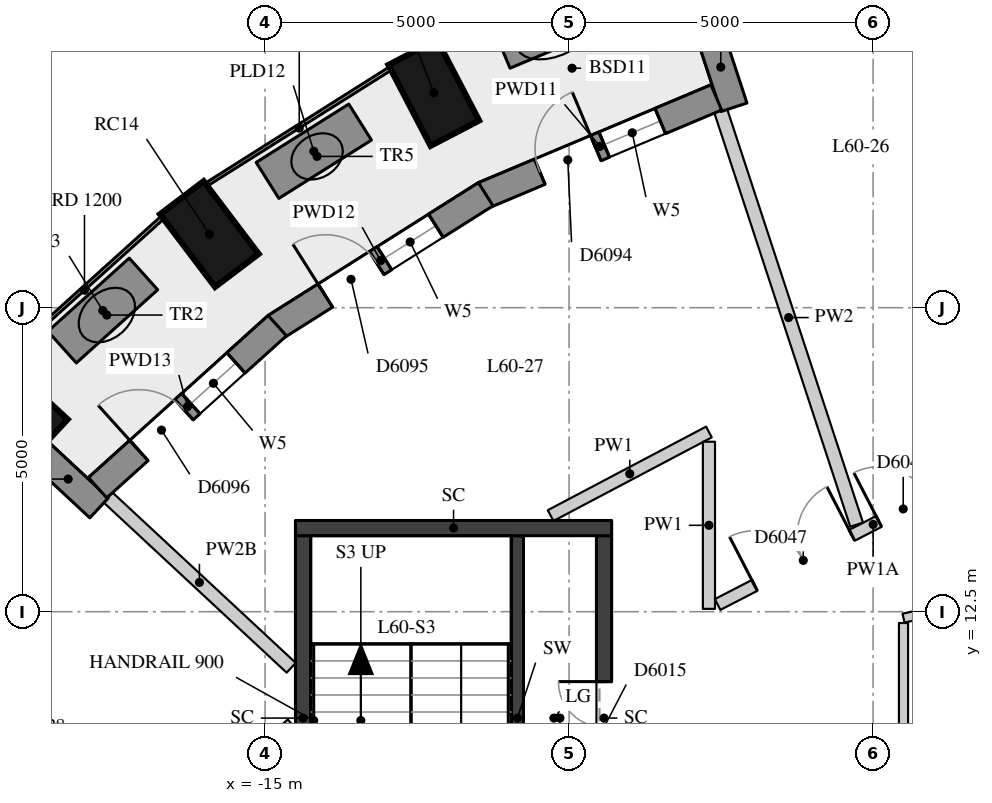
"""IFC4 building model, lengths in metres.
Left out: names, types, materials, properties, quantities, classifications, styles, units other than length and angle.
Written with IfcOpenShell. Run it as: python <this file> out.ifc"""

import sys

from ifc_helpers import new_model, si_unit, direction, frame, frame_2d, origin, origin_2d, place, context, subcontext, project, spatial, rectangle, extrude, element, fill, save


model = new_model("IFC4")
c1 = context("Model", 3, precision=1e-05, world=origin(), true_north=direction((0.0, 1.0)))
c2 = subcontext(c1, "Body", "Model", "MODEL_VIEW")
j1 = project(units=[si_unit("LENGTHUNIT", "METRE"), si_unit("PLANEANGLEUNIT", "RADIAN")], contexts=[c1])
p1 = place(None, origin())
s1 = spatial("IfcSite", under=j1, at=p1, CompositionType="ELEMENT")
p2 = place(p1, origin())
s2 = spatial("IfcBuilding", under=s1, at=p2, CompositionType="ELEMENT")
p3 = place(p2, frame((0.0, 0.0, 212.3)))
s3 = spatial("IfcBuildingStorey", under=s2, at=p3, CompositionType="ELEMENT", Elevation=212.3)
for number, where, z_axis, x_axis in (
    (1, (-12.225, 21.035, 0.0), (0.0, 0.0, 1.0), (-0.462, 0.887, 0.0)),
    (2, (-15.916, 18.71, 0.0), (0.0, 0.0, 1.0), (-0.604, 0.797, 0.0)),
    (3, (-19.102, 15.845, 0.0), (0.0, 0.0, 1.0), (-0.732, 0.681, 0.0)),
):
    element("IfcColumn", number, at=place(p3, frame(where, z_axis=z_axis, x_axis=x_axis)), inside=s3, PredefinedType="COLUMN", context=c2, shape_type="SweptSolid", body=[
        extrude(rectangle(XDim=1.5, YDim=0.9, at=origin_2d()), origin(), (0.0, 0.0, 1.0), 3.3),
    ])
p4 = place(p3, frame((-7.722, 22.117, 0.0), z_axis=(0.0, 0.0, 1.0), x_axis=(0.312062715826, -0.950061504005, 0.0)))
e4 = element("IfcWall", 4, at=p4, inside=s3, PredefinedType="SOLIDWALL", context=c2, shape_type="SweptSolid", body=[
    extrude(rectangle(XDim=1.39, YDim=0.45, at=frame_2d((0.695, 0.0))), origin(), (0.0, 0.0, 1.0), 3.02),
])
p5 = place(p3, frame((-18.747, 15.155, 0.0), z_axis=(0.0, 0.0, 1.0), x_axis=(0.732349544388, -0.680928883831, 0.0)))
e5 = element("IfcWall", 5, at=p5, inside=s3, PredefinedType="SOLIDWALL", context=c2, shape_type="SweptSolid", body=[
    extrude(rectangle(XDim=1.391, YDim=0.45, at=frame_2d((0.696, 0.0))), origin(), (0.0, 0.0, 1.0), 2.57),
])
p6 = place(p3, frame((-7.579, 20.958, 0.0), z_axis=(0.0, 0.0, 1.0), x_axis=(-0.921750495838, -0.387783474923, 0.0)))
e6 = element("IfcWall", 6, at=p6, inside=s3, PredefinedType="SOLIDWALL", context=c2, shape_type="SweptSolid", body=[
    extrude(rectangle(XDim=4.15, YDim=0.45, at=frame_2d((2.075, 0.0))), origin(), (0.0, 0.0, 1.0), 3.02),
])
p7 = place(p6, frame((1.0, 0.0, 0.4)))
e7 = element("IfcOpeningElement", 7, at=p7, cuts=e6, PredefinedType="OPENING", context=c2, shape_type="SweptSolid", body=[
    extrude(rectangle(XDim=1.0, YDim=1.75, at=frame_2d((0.5, 0.875))), frame((0.0, 0.235, 0.0), z_axis=(0.0, -1.0, 0.0), x_axis=(1.0, 0.0, 0.0)), (0.0, 0.0, 1.0), 0.47),
])
p8 = place(p6, frame((2.15, 0.0, 0.0)))
e8 = element("IfcOpeningElement", 8, at=p8, cuts=e6, PredefinedType="OPENING", context=c2, shape_type="SweptSolid", body=[
    extrude(rectangle(XDim=1.0, YDim=2.15, at=frame_2d((0.5, 1.075))), frame((0.0, 0.235, 0.0), z_axis=(0.0, -1.0, 0.0), x_axis=(1.0, 0.0, 0.0)), (0.0, 0.0, 1.0), 0.47),
])
p9 = place(p3, frame((-11.371, 19.366, 0.0), z_axis=(0.0, 0.0, 1.0), x_axis=(-0.845443515445, -0.534064848302, 0.0)))
e9 = element("IfcWall", 9, at=p9, inside=s3, PredefinedType="SOLIDWALL", context=c2, shape_type="SweptSolid", body=[
    extrude(rectangle(XDim=4.091, YDim=0.45, at=frame_2d((2.045, 0.0))), origin(), (0.0, 0.0, 1.0), 3.02),
])
p10 = place(p9, frame((0.97, 0.0, 0.4)))
e10 = element("IfcOpeningElement", 10, at=p10, cuts=e9, PredefinedType="OPENING", context=c2, shape_type="SweptSolid", body=[
    extrude(rectangle(XDim=1.0, YDim=1.75, at=frame_2d((0.5, 0.875))), frame((0.0, 0.235, 0.0), z_axis=(0.0, -1.0, 0.0), x_axis=(1.0, 0.0, 0.0)), (0.0, 0.0, 1.0), 0.47),
])
p11 = place(p9, frame((2.12, 0.0, 0.0)))
e11 = element("IfcOpeningElement", 11, at=p11, cuts=e9, PredefinedType="OPENING", context=c2, shape_type="SweptSolid", body=[
    extrude(rectangle(XDim=1.0, YDim=2.15, at=frame_2d((0.5, 1.075))), frame((0.0, 0.235, 0.0), z_axis=(0.0, -1.0, 0.0), x_axis=(1.0, 0.0, 0.0)), (0.0, 0.0, 1.0), 0.47),
])
p12 = place(p3, frame((-14.799, 17.205, 0.0), z_axis=(0.0, 0.0, 1.0), x_axis=(-0.742488361714, -0.669858964798, 0.0)))
e12 = element("IfcWall", 12, at=p12, inside=s3, PredefinedType="SOLIDWALL", context=c2, shape_type="SweptSolid", body=[
    extrude(rectangle(XDim=3.98, YDim=0.45, at=frame_2d((1.99, 0.0))), origin(), (0.0, 0.0, 1.0), 3.02),
])
p13 = place(p12, frame((0.915, 0.0, 0.4)))
e13 = element("IfcOpeningElement", 13, at=p13, cuts=e12, PredefinedType="OPENING", context=c2, shape_type="SweptSolid", body=[
    extrude(rectangle(XDim=1.0, YDim=1.75, at=frame_2d((0.5, 0.875))), frame((0.0, 0.235, 0.0), z_axis=(0.0, -1.0, 0.0), x_axis=(1.0, 0.0, 0.0)), (0.0, 0.0, 1.0), 0.47),
])
p14 = place(p12, frame((2.065, 0.0, 0.0)))
e14 = element("IfcOpeningElement", 14, at=p14, cuts=e12, PredefinedType="OPENING", context=c2, shape_type="SweptSolid", body=[
    extrude(rectangle(XDim=1.0, YDim=2.15, at=frame_2d((0.5, 1.075))), frame((0.0, 0.235, 0.0), z_axis=(0.0, -1.0, 0.0), x_axis=(1.0, 0.0, 0.0)), (0.0, 0.0, 1.0), 0.47),
])
for number, where, z_axis, x_axis in (
    (15, (-9.446, 22.458, 0.0), (0.0, 0.0, 1.0), (-0.922, -0.387, 0.0)),
    (16, (-13.437, 20.552, 0.0), (0.0, 0.0, 1.0), (-0.846, -0.533, 0.0)),
    (17, (-17.0, 18.055, 0.0), (0.0, 0.0, 1.0), (-0.743, -0.669, 0.0)),
):
    element("IfcWall", number, at=place(p3, frame(where, z_axis=z_axis, x_axis=x_axis)), inside=s3, PredefinedType="USERDEFINED", context=c2, shape_type="SweptSolid", body=[
        extrude(rectangle(XDim=1.8, YDim=0.7, at=frame_2d((0.9, 0.0))), origin(), (0.0, 0.0, 1.0), 0.75),
    ])
p15 = place(p3, frame((-10.85, 7.75, 0.0), z_axis=(0.0, 0.0, 1.0), x_axis=(0.0, 1.0, 0.0)))
e18 = element("IfcWall", 18, at=p15, inside=s3, PredefinedType="SHEAR", context=c2, shape_type="SweptSolid", body=[
    extrude(rectangle(XDim=6.0, YDim=0.2, at=frame_2d((3.0, 0.0))), origin(), (0.0, 0.0, 1.0), 3.02),
])
p16 = place(p15, frame((0.1, 0.0, 0.0)))
e19 = element("IfcOpeningElement", 19, at=p16, cuts=e18, PredefinedType="OPENING", context=c2, shape_type="SweptSolid", body=[
    extrude(rectangle(XDim=1.5, YDim=2.1, at=frame_2d((0.75, 1.05))), frame((0.0, 0.11, 0.0), z_axis=(0.0, -1.0, 0.0), x_axis=(1.0, 0.0, 0.0)), (0.0, 0.0, 1.0), 0.22),
])
p17 = place(p3, frame((-14.375, 7.75, -0.28), z_axis=(0.0, 0.0, 1.0), x_axis=(0.0, 1.0, 0.0)))
e20 = element("IfcWall", 20, at=p17, inside=s3, PredefinedType="SHEAR", context=c2, shape_type="SweptSolid", body=[
    extrude(rectangle(XDim=6.0, YDim=0.25, at=frame_2d((3.0, 0.0))), origin(), (0.0, 0.0, 1.0), 3.3),
])
p18 = place(p3, frame((-9.425, 7.75, -0.28), z_axis=(0.0, 0.0, 1.0), x_axis=(0.0, 1.0, 0.0)))
e21 = element("IfcWall", 21, at=p18, inside=s3, PredefinedType="SHEAR", context=c2, shape_type="SweptSolid", body=[
    extrude(rectangle(XDim=6.0, YDim=0.25, at=frame_2d((3.0, 0.0))), origin(), (0.0, 0.0, 1.0), 3.3),
])
p19 = place(p18, frame((2.1, 0.0, 0.28)))
e22 = element("IfcOpeningElement", 22, at=p19, cuts=e21, PredefinedType="OPENING", context=c2, shape_type="SweptSolid", body=[
    extrude(rectangle(XDim=1.5, YDim=2.1, at=frame_2d((0.75, 1.05))), frame((0.0, 0.135, 0.0), z_axis=(0.0, -1.0, 0.0), x_axis=(1.0, 0.0, 0.0)), (0.0, 0.0, 1.0), 0.27),
])
p20 = place(p3, frame((-14.5, 13.875, -0.28), z_axis=(0.0, 0.0, 1.0), x_axis=(1.0, 0.0, 0.0)))
e23 = element("IfcWall", 23, at=p20, inside=s3, PredefinedType="SHEAR", context=c2, shape_type="SweptSolid", body=[
    extrude(rectangle(XDim=5.2, YDim=0.25, at=frame_2d((2.6, 0.0))), origin(), (0.0, 0.0, 1.0), 3.3),
])
p21 = place(p3, frame((-16.24, 9.136, 0.0), z_axis=(0.0, 0.0, 1.0), x_axis=(0.74251608424, 0.66982823518, 0.0)))
e24 = element("IfcWall", 24, at=p21, inside=s3, PredefinedType="PARTITIONING", context=c2, shape_type="SweptSolid", body=[
    extrude(rectangle(XDim=2.264, YDim=0.2, at=frame_2d((1.132, 0.0))), origin(), (0.0, 0.0, 1.0), 3.02),
])
p22 = place(p3, frame((-10.304, 14.081, 0.0), z_axis=(0.0, 0.0, 1.0), x_axis=(0.884325802624, 0.466870297635, 0.0)))
e25 = element("IfcWall", 25, at=p22, inside=s3, PredefinedType="PARTITIONING", context=c2, shape_type="SweptSolid", body=[
    extrude(rectangle(XDim=2.945, YDim=0.2, at=frame_2d((1.472, 0.0))), origin(), (0.0, 0.0, 1.0), 3.02),
])
p23 = place(p3, frame((-7.7, 15.295, 0.0), z_axis=(0.0, 0.0, 1.0), x_axis=(0.0, -1.0, 0.0)))
e26 = element("IfcWall", 26, at=p23, inside=s3, PredefinedType="PARTITIONING", context=c2, shape_type="SweptSolid", body=[
    extrude(rectangle(XDim=2.749, YDim=0.2, at=frame_2d((1.375, 0.0))), origin(), (0.0, 0.0, 1.0), 3.02),
])
p24 = place(p3, frame((-7.557, 12.619, 0.0), z_axis=(0.0, 0.0, 1.0), x_axis=(0.889086035914, 0.457740123588, 0.0)))
e27 = element("IfcWall", 27, at=p24, inside=s3, PredefinedType="PARTITIONING", context=c2, shape_type="SweptSolid", body=[
    extrude(rectangle(XDim=5.753, YDim=0.2, at=frame_2d((2.877, 0.0))), origin(), (0.0, 0.0, 1.0), 2.57),
])
p25 = place(p24, frame((2.983, 0.0, 0.0)))
e28 = element("IfcOpeningElement", 28, at=p25, cuts=e27, PredefinedType="OPENING", context=c2, shape_type="SweptSolid", body=[
    extrude(rectangle(XDim=0.9, YDim=2.1, at=frame_2d((0.45, 1.05))), frame((0.0, 0.11, 0.0), z_axis=(0.0, -1.0, 0.0), x_axis=(1.0, 0.0, 0.0)), (0.0, 0.0, 1.0), 0.22),
])
p26 = place(p24, frame((0.685, 0.0, 0.0)))
e29 = element("IfcOpeningElement", 29, at=p26, cuts=e27, PredefinedType="OPENING", context=c2, shape_type="SweptSolid", body=[
    extrude(rectangle(XDim=1.8, YDim=2.1, at=frame_2d((0.9, 1.05))), frame((0.0, 0.11, 0.0), z_axis=(0.0, -1.0, 0.0), x_axis=(1.0, 0.0, 0.0)), (0.0, 0.0, 1.0), 0.22),
])
p27 = place(p3, frame((-4.5, 12.394, 0.0), z_axis=(0.0, 0.0, 1.0), x_axis=(0.976122911094, 0.217218927437, 0.0)))
e30 = element("IfcWall", 30, at=p27, inside=s3, PredefinedType="PARTITIONING", context=c2, shape_type="SweptSolid", body=[
    extrude(rectangle(XDim=1.971, YDim=0.15, at=frame_2d((0.986, 0.0))), origin(), (0.0, 0.0, 1.0), 3.02),
])
p28 = place(p3, frame((-4.5, 8.77, 0.0), z_axis=(0.0, 0.0, 1.0), x_axis=(0.0, 1.0, 0.0)))
e31 = element("IfcWall", 31, at=p28, inside=s3, PredefinedType="PARTITIONING", context=c2, shape_type="SweptSolid", body=[
    extrude(rectangle(XDim=3.543, YDim=0.15, at=frame_2d((1.772, 0.0))), origin(), (0.0, 0.0, 1.0), 3.02),
])
p29 = place(p3, frame((-7.508, 20.743, 0.0), z_axis=(0.0, 0.0, 1.0), x_axis=(0.31199567476, -0.950083522082, 0.0)))
e32 = element("IfcWall", 32, at=p29, inside=s3, PredefinedType="PARTITIONING", context=c2, shape_type="SweptSolid", body=[
    extrude(rectangle(XDim=7.17, YDim=0.22, at=frame_2d((3.585, 0.0))), origin(), (0.0, 0.0, 1.0), 3.02),
])
p30 = place(p3, frame((-17.589, 14.385, 0.0), z_axis=(0.0, 0.0, 1.0), x_axis=(0.732287016614, -0.680996127227, 0.0)))
e33 = element("IfcWall", 33, at=p30, inside=s3, PredefinedType="PARTITIONING", context=c2, shape_type="SweptSolid", body=[
    extrude(rectangle(XDim=4.122, YDim=0.22, at=frame_2d((2.061, 0.0))), origin(), (0.0, 0.0, 1.0), 2.57),
])
p31 = place(p7, origin())
e34 = element("IfcWindow", 34, at=p31, inside=s3, PartitioningType="SINGLE_PANEL", PredefinedType="WINDOW", context=c2, shape_type="SweptSolid", body=[
    extrude(rectangle(XDim=1.0, YDim=1.75, at=frame_2d((0.5, 0.875))), frame((0.0, 0.035, 0.0), z_axis=(0.0, -1.0, 0.0), x_axis=(1.0, 0.0, 0.0)), (0.0, 0.0, 1.0), 0.06),
])
fill(e7, e34)
p32 = place(p8, frame((1.0, 0.0, 0.0), z_axis=(0.0, 0.0, 1.0), x_axis=(-1.0, 0.0, 0.0)))
e35 = element("IfcDoor", 35, at=p32, inside=s3, OperationType="SINGLE_SWING_RIGHT", PredefinedType="DOOR", context=c2, shape_type="SweptSolid", body=[
    extrude(rectangle(XDim=1.0, YDim=2.15, at=frame_2d((0.5, 1.075))), frame((0.0, 0.075, 0.0), z_axis=(0.0, -1.0, 0.0), x_axis=(1.0, 0.0, 0.0)), (0.0, 0.0, 1.0), 0.05),
])
fill(e8, e35)
p33 = place(p10, origin())
e36 = element("IfcWindow", 36, at=p33, inside=s3, PartitioningType="SINGLE_PANEL", PredefinedType="WINDOW", context=c2, shape_type="SweptSolid", body=[
    extrude(rectangle(XDim=1.0, YDim=1.75, at=frame_2d((0.5, 0.875))), frame((0.0, 0.035, 0.0), z_axis=(0.0, -1.0, 0.0), x_axis=(1.0, 0.0, 0.0)), (0.0, 0.0, 1.0), 0.06),
])
fill(e10, e36)
p34 = place(p11, frame((1.0, 0.0, 0.0), z_axis=(0.0, 0.0, 1.0), x_axis=(-1.0, 0.0, 0.0)))
e37 = element("IfcDoor", 37, at=p34, inside=s3, OperationType="SINGLE_SWING_LEFT", PredefinedType="DOOR", context=c2, shape_type="SweptSolid", body=[
    extrude(rectangle(XDim=1.0, YDim=2.15, at=frame_2d((0.5, 1.075))), frame((0.0, 0.075, 0.0), z_axis=(0.0, -1.0, 0.0), x_axis=(1.0, 0.0, 0.0)), (0.0, 0.0, 1.0), 0.05),
])
fill(e11, e37)
p35 = place(p13, origin())
e38 = element("IfcWindow", 38, at=p35, inside=s3, PartitioningType="SINGLE_PANEL", PredefinedType="WINDOW", context=c2, shape_type="SweptSolid", body=[
    extrude(rectangle(XDim=1.0, YDim=1.75, at=frame_2d((0.5, 0.875))), frame((0.0, 0.035, 0.0), z_axis=(0.0, -1.0, 0.0), x_axis=(1.0, 0.0, 0.0)), (0.0, 0.0, 1.0), 0.06),
])
fill(e13, e38)
p36 = place(p14, frame((1.0, 0.0, 0.0), z_axis=(0.0, 0.0, 1.0), x_axis=(-1.0, 0.0, 0.0)))
e39 = element("IfcDoor", 39, at=p36, inside=s3, OperationType="SINGLE_SWING_LEFT", PredefinedType="DOOR", context=c2, shape_type="SweptSolid", body=[
    extrude(rectangle(XDim=1.0, YDim=2.15, at=frame_2d((0.5, 1.075))), frame((0.0, 0.075, 0.0), z_axis=(0.0, -1.0, 0.0), x_axis=(1.0, 0.0, 0.0)), (0.0, 0.0, 1.0), 0.05),
])
fill(e14, e39)
p37 = place(p19, origin())
e40 = element("IfcDoor", 40, at=p37, inside=s3, OperationType="DOUBLE_DOOR_SINGLE_SWING", PredefinedType="DOOR", context=c2, shape_type="SweptSolid", body=[
    extrude(rectangle(XDim=1.5, YDim=2.1, at=frame_2d((0.75, 1.05))), frame((0.0, 0.025, 0.0), z_axis=(0.0, -1.0, 0.0), x_axis=(1.0, 0.0, 0.0)), (0.0, 0.0, 1.0), 0.05),
])
fill(e22, e40)
p38 = place(p25, origin())
e41 = element("IfcDoor", 41, at=p38, inside=s3, OperationType="SINGLE_SWING_LEFT", PredefinedType="DOOR", context=c2, shape_type="SweptSolid", body=[
    extrude(rectangle(XDim=0.9, YDim=2.1, at=frame_2d((0.45, 1.05))), frame((0.0, 0.025, 0.0), z_axis=(0.0, -1.0, 0.0), x_axis=(1.0, 0.0, 0.0)), (0.0, 0.0, 1.0), 0.05),
])
fill(e28, e41)
p39 = place(p26, origin())
e42 = element("IfcDoor", 42, at=p39, inside=s3, OperationType="DOUBLE_DOOR_SINGLE_SWING", PredefinedType="DOOR", context=c2, shape_type="SweptSolid", body=[
    extrude(rectangle(XDim=1.8, YDim=2.1, at=frame_2d((0.9, 1.05))), frame((0.0, 0.025, 0.0), z_axis=(0.0, -1.0, 0.0), x_axis=(1.0, 0.0, 0.0)), (0.0, 0.0, 1.0), 0.05),
])
fill(e29, e42)
save(model, sys.argv[1])
